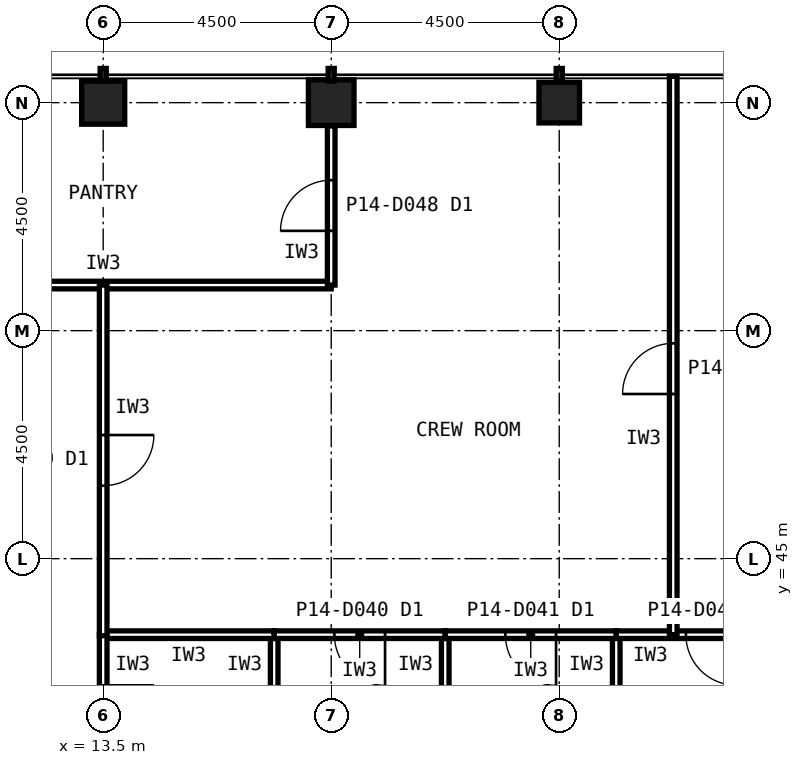
"""IFC4 building model, lengths in metres.
Left out: names, types, materials, properties, quantities, classifications, styles, units other than length and angle.
Written with IfcOpenShell. Run it as: python <this file> out.ifc"""

import sys

from ifc_helpers import new_model, si_unit, direction, frame, frame_2d, origin, origin_2d, place, context, subcontext, project, spatial, rectangle, hollow_rectangle, extrude, element, fill, save


model = new_model("IFC4")
c1 = context("Model", 3, precision=1e-05, world=origin(), true_north=direction((0.0, 1.0)))
c2 = subcontext(c1, "Body", "Model", "MODEL_VIEW")
j1 = project(units=[si_unit("LENGTHUNIT", "METRE"), si_unit("PLANEANGLEUNIT", "RADIAN")], contexts=[c1])
p1 = place(None, origin())
s1 = spatial("IfcSite", under=j1, at=p1, CompositionType="ELEMENT")
p2 = place(p1, origin())
s2 = spatial("IfcBuilding", under=s1, at=p2, CompositionType="ELEMENT")
p3 = place(p2, frame((0.0, 0.0, 62.6)))
s3 = spatial("IfcBuildingStorey", under=s2, at=p3, CompositionType="ELEMENT", Elevation=62.6)
p4 = place(p3, frame((22.5, 54.0, 0.0), z_axis=(0.0, 0.0, 1.0), x_axis=(1.0, 0.0, 0.0)))
e1 = element("IfcColumn", 1, at=p4, inside=s3, PredefinedType="COLUMN", context=c2, shape_type="SweptSolid", body=[
    extrude(hollow_rectangle(XDim=0.8, YDim=0.8, WallThickness=0.045, at=origin_2d()), origin(), (0.0, 0.0, 1.0), 4.2),
])
p5 = place(p3, frame((18.0, 54.0, 0.0), z_axis=(0.0, 0.0, 1.0), x_axis=(1.0, 0.0, 0.0)))
e2 = element("IfcColumn", 2, at=p5, inside=s3, PredefinedType="COLUMN", context=c2, shape_type="SweptSolid", body=[
    extrude(hollow_rectangle(XDim=0.9, YDim=0.9, WallThickness=0.063, at=origin_2d()), origin(), (0.0, 0.0, 1.0), 4.2),
])
p6 = place(p3, frame((13.5, 54.0, 0.0), z_axis=(0.0, 0.0, 1.0), x_axis=(1.0, 0.0, 0.0)))
e3 = element("IfcColumn", 3, at=p6, inside=s3, PredefinedType="COLUMN", context=c2, shape_type="SweptSolid", body=[
    extrude(hollow_rectangle(XDim=0.85, YDim=0.85, WallThickness=0.05, at=origin_2d()), origin(), (0.0, 0.0, 1.0), 4.2),
])
p7 = place(p3, frame((16.875, 40.5, 0.0), z_axis=(0.0, 0.0, 1.0), x_axis=(0.0, 1.0, 0.0)))
e4 = element("IfcWall", 4, at=p7, inside=s3, PredefinedType="PARTITIONING", context=c2, shape_type="SweptSolid", body=[
    extrude(rectangle(XDim=3.0, YDim=0.15, at=frame_2d((1.5, 0.0))), origin(), (0.0, 0.0, 1.0), 4.04),
])
p8 = place(p3, frame((16.875, 43.5, 0.0), z_axis=(0.0, 0.0, 1.0), x_axis=(-1.0, 0.0, 0.0)))
e5 = element("IfcWall", 5, at=p8, inside=s3, PredefinedType="PARTITIONING", context=c2, shape_type="SweptSolid", body=[
    extrude(rectangle(XDim=3.375, YDim=0.15, at=frame_2d((1.688, 0.0))), origin(), (0.0, 0.0, 1.0), 4.04),
])
p9 = place(p3, frame((13.5, 43.5, 0.0), z_axis=(0.0, 0.0, 1.0), x_axis=(0.0, -1.0, 0.0)))
e6 = element("IfcWall", 6, at=p9, inside=s3, PredefinedType="PARTITIONING", context=c2, shape_type="SweptSolid", body=[
    extrude(rectangle(XDim=3.0, YDim=0.15, at=frame_2d((1.5, 0.0))), origin(), (0.0, 0.0, 1.0), 3.189),
])
p10 = place(p9, frame((1.0, 0.0, 0.0)))
e7 = element("IfcOpeningElement", 7, at=p10, cuts=e6, PredefinedType="OPENING", context=c2, shape_type="SweptSolid", body=[
    extrude(rectangle(XDim=1.0, YDim=2.1, at=frame_2d((0.5, 1.05))), frame((0.0, 0.085, 0.0), z_axis=(0.0, -1.0, 0.0), x_axis=(1.0, 0.0, 0.0)), (0.0, 0.0, 1.0), 0.17),
])
p11 = place(p3, frame((20.25, 40.5, 0.0), z_axis=(0.0, 0.0, 1.0), x_axis=(0.0, 1.0, 0.0)))
e8 = element("IfcWall", 8, at=p11, inside=s3, PredefinedType="PARTITIONING", context=c2, shape_type="SweptSolid", body=[
    extrude(rectangle(XDim=3.0, YDim=0.15, at=frame_2d((1.5, 0.0))), origin(), (0.0, 0.0, 1.0), 4.04),
])
p12 = place(p3, frame((20.25, 43.5, 0.0), z_axis=(0.0, 0.0, 1.0), x_axis=(-1.0, 0.0, 0.0)))
e9 = element("IfcWall", 9, at=p12, inside=s3, PredefinedType="PARTITIONING", context=c2, shape_type="SweptSolid", body=[
    extrude(rectangle(XDim=3.375, YDim=0.15, at=frame_2d((1.688, 0.0))), origin(), (0.0, 0.0, 1.0), 4.04),
])
p13 = place(p12, frame((1.188, 0.0, 0.0)))
e10 = element("IfcOpeningElement", 10, at=p13, cuts=e9, PredefinedType="OPENING", context=c2, shape_type="SweptSolid", body=[
    extrude(rectangle(XDim=1.0, YDim=2.1, at=frame_2d((0.5, 1.05))), frame((0.0, 0.085, 0.0), z_axis=(0.0, -1.0, 0.0), x_axis=(1.0, 0.0, 0.0)), (0.0, 0.0, 1.0), 0.17),
])
p14 = place(p3, frame((23.625, 40.5, 0.0), z_axis=(0.0, 0.0, 1.0), x_axis=(0.0, 1.0, 0.0)))
e11 = element("IfcWall", 11, at=p14, inside=s3, PredefinedType="PARTITIONING", context=c2, shape_type="SweptSolid", body=[
    extrude(rectangle(XDim=3.0, YDim=0.15, at=frame_2d((1.5, 0.0))), origin(), (0.0, 0.0, 1.0), 4.04),
])
p15 = place(p3, frame((23.625, 43.5, 0.0), z_axis=(0.0, 0.0, 1.0), x_axis=(-1.0, 0.0, 0.0)))
e12 = element("IfcWall", 12, at=p15, inside=s3, PredefinedType="PARTITIONING", context=c2, shape_type="SweptSolid", body=[
    extrude(rectangle(XDim=3.375, YDim=0.15, at=frame_2d((1.688, 0.0))), origin(), (0.0, 0.0, 1.0), 4.04),
])
p16 = place(p15, frame((1.188, 0.0, 0.0)))
e13 = element("IfcOpeningElement", 13, at=p16, cuts=e12, PredefinedType="OPENING", context=c2, shape_type="SweptSolid", body=[
    extrude(rectangle(XDim=1.0, YDim=2.1, at=frame_2d((0.5, 1.05))), frame((0.0, 0.085, 0.0), z_axis=(0.0, -1.0, 0.0), x_axis=(1.0, 0.0, 0.0)), (0.0, 0.0, 1.0), 0.17),
])
p17 = place(p3, frame((27.0, 43.5, 0.0), z_axis=(0.0, 0.0, 1.0), x_axis=(-1.0, 0.0, 0.0)))
e14 = element("IfcWall", 14, at=p17, inside=s3, PredefinedType="PARTITIONING", context=c2, shape_type="SweptSolid", body=[
    extrude(rectangle(XDim=3.375, YDim=0.15, at=frame_2d((1.688, 0.0))), origin(), (0.0, 0.0, 1.0), 4.04),
])
p18 = place(p17, frame((1.0, 0.0, 0.0)))
e15 = element("IfcOpeningElement", 15, at=p18, cuts=e14, PredefinedType="OPENING", context=c2, shape_type="SweptSolid", body=[
    extrude(rectangle(XDim=1.0, YDim=2.1, at=frame_2d((0.5, 1.05))), frame((0.0, 0.085, 0.0), z_axis=(0.0, -1.0, 0.0), x_axis=(1.0, 0.0, 0.0)), (0.0, 0.0, 1.0), 0.17),
])
p19 = place(p3, frame((9.0, 50.4, 0.0), z_axis=(0.0, 0.0, 1.0), x_axis=(1.0, 0.0, 0.0)))
e16 = element("IfcWall", 16, at=p19, inside=s3, PredefinedType="PARTITIONING", context=c2, shape_type="SweptSolid", body=[
    extrude(rectangle(XDim=9.0, YDim=0.15, at=frame_2d((4.5, 0.0))), origin(), (0.0, 0.0, 1.0), 4.04),
])
p20 = place(p3, frame((18.0, 50.4, 0.0), z_axis=(0.0, 0.0, 1.0), x_axis=(0.0, 1.0, 0.0)))
e17 = element("IfcWall", 17, at=p20, inside=s3, PredefinedType="PARTITIONING", context=c2, shape_type="SweptSolid", body=[
    extrude(rectangle(XDim=3.14, YDim=0.15, at=frame_2d((1.57, 0.0))), origin(), (0.0, 0.0, 1.0), 3.189),
])
p21 = place(p20, frame((1.07, 0.0, 0.0)))
e18 = element("IfcOpeningElement", 18, at=p21, cuts=e17, PredefinedType="OPENING", context=c2, shape_type="SweptSolid", body=[
    extrude(rectangle(XDim=1.0, YDim=2.1, at=frame_2d((0.5, 1.05))), frame((0.0, 0.085, 0.0), z_axis=(0.0, -1.0, 0.0), x_axis=(1.0, 0.0, 0.0)), (0.0, 0.0, 1.0), 0.17),
])
p22 = place(p3, frame((24.75, 43.5, 0.0), z_axis=(0.0, 0.0, 1.0), x_axis=(0.0, 1.0, 0.0)))
e19 = element("IfcWall", 19, at=p22, inside=s3, PredefinedType="PARTITIONING", context=c2, shape_type="SweptSolid", body=[
    extrude(rectangle(XDim=11.02, YDim=0.15, at=frame_2d((5.51, 0.0))), origin(), (0.0, 0.0, 1.0), 4.04),
])
p23 = place(p22, frame((4.75, 0.0, 0.0)))
e20 = element("IfcOpeningElement", 20, at=p23, cuts=e19, PredefinedType="OPENING", context=c2, shape_type="SweptSolid", body=[
    extrude(rectangle(XDim=1.0, YDim=2.1, at=frame_2d((0.5, 1.05))), frame((0.0, 0.085, 0.0), z_axis=(0.0, -1.0, 0.0), x_axis=(1.0, 0.0, 0.0)), (0.0, 0.0, 1.0), 0.17),
])
p24 = place(p3, frame((13.5, 50.4, 0.0), z_axis=(0.0, 0.0, 1.0), x_axis=(0.0, -1.0, 0.0)))
e21 = element("IfcWall", 21, at=p24, inside=s3, PredefinedType="PARTITIONING", context=c2, shape_type="SweptSolid", body=[
    extrude(rectangle(XDim=6.92, YDim=0.15, at=frame_2d((3.46, 0.0))), origin(), (0.0, 0.0, 1.0), 3.189),
])
p25 = place(p24, frame((2.96, 0.0, 0.0)))
e22 = element("IfcOpeningElement", 22, at=p25, cuts=e21, PredefinedType="OPENING", context=c2, shape_type="SweptSolid", body=[
    extrude(rectangle(XDim=1.0, YDim=2.1, at=frame_2d((0.5, 1.05))), frame((0.0, 0.085, 0.0), z_axis=(0.0, -1.0, 0.0), x_axis=(1.0, 0.0, 0.0)), (0.0, 0.0, 1.0), 0.17),
])
p26 = place(p13, origin())
e23 = element("IfcDoor", 23, at=p26, inside=s3, OperationType="SINGLE_SWING_LEFT", PredefinedType="DOOR", context=c2, shape_type="SweptSolid", body=[
    extrude(rectangle(XDim=1.0, YDim=2.1, at=frame_2d((0.5, 1.05))), frame((0.0, 0.025, 0.0), z_axis=(0.0, -1.0, 0.0), x_axis=(1.0, 0.0, 0.0)), (0.0, 0.0, 1.0), 0.05),
])
fill(e10, e23)
p27 = place(p16, origin())
e24 = element("IfcDoor", 24, at=p27, inside=s3, OperationType="SINGLE_SWING_LEFT", PredefinedType="DOOR", context=c2, shape_type="SweptSolid", body=[
    extrude(rectangle(XDim=1.0, YDim=2.1, at=frame_2d((0.5, 1.05))), frame((0.0, 0.025, 0.0), z_axis=(0.0, -1.0, 0.0), x_axis=(1.0, 0.0, 0.0)), (0.0, 0.0, 1.0), 0.05),
])
fill(e13, e24)
p28 = place(p18, origin())
e25 = element("IfcDoor", 25, at=p28, inside=s3, OperationType="SINGLE_SWING_LEFT", PredefinedType="DOOR", context=c2, shape_type="SweptSolid", body=[
    extrude(rectangle(XDim=1.0, YDim=2.1, at=frame_2d((0.5, 1.05))), frame((0.0, 0.025, 0.0), z_axis=(0.0, -1.0, 0.0), x_axis=(1.0, 0.0, 0.0)), (0.0, 0.0, 1.0), 0.05),
])
fill(e15, e25)
p29 = place(p21, origin())
e26 = element("IfcDoor", 26, at=p29, inside=s3, OperationType="SINGLE_SWING_LEFT", PredefinedType="DOOR", context=c2, shape_type="SweptSolid", body=[
    extrude(rectangle(XDim=1.0, YDim=2.1, at=frame_2d((0.5, 1.05))), frame((0.0, 0.025, 0.0), z_axis=(0.0, -1.0, 0.0), x_axis=(1.0, 0.0, 0.0)), (0.0, 0.0, 1.0), 0.05),
])
fill(e18, e26)
p30 = place(p23, origin())
e27 = element("IfcDoor", 27, at=p30, inside=s3, OperationType="SINGLE_SWING_LEFT", PredefinedType="DOOR", context=c2, shape_type="SweptSolid", body=[
    extrude(rectangle(XDim=1.0, YDim=2.1, at=frame_2d((0.5, 1.05))), frame((0.0, 0.025, 0.0), z_axis=(0.0, -1.0, 0.0), x_axis=(1.0, 0.0, 0.0)), (0.0, 0.0, 1.0), 0.05),
])
fill(e20, e27)
p31 = place(p25, origin())
e28 = element("IfcDoor", 28, at=p31, inside=s3, OperationType="SINGLE_SWING_LEFT", PredefinedType="DOOR", context=c2, shape_type="SweptSolid", body=[
    extrude(rectangle(XDim=1.0, YDim=2.1, at=frame_2d((0.5, 1.05))), frame((0.0, 0.025, 0.0), z_axis=(0.0, -1.0, 0.0), x_axis=(1.0, 0.0, 0.0)), (0.0, 0.0, 1.0), 0.05),
])
fill(e22, e28)
save(model, sys.argv[1])
